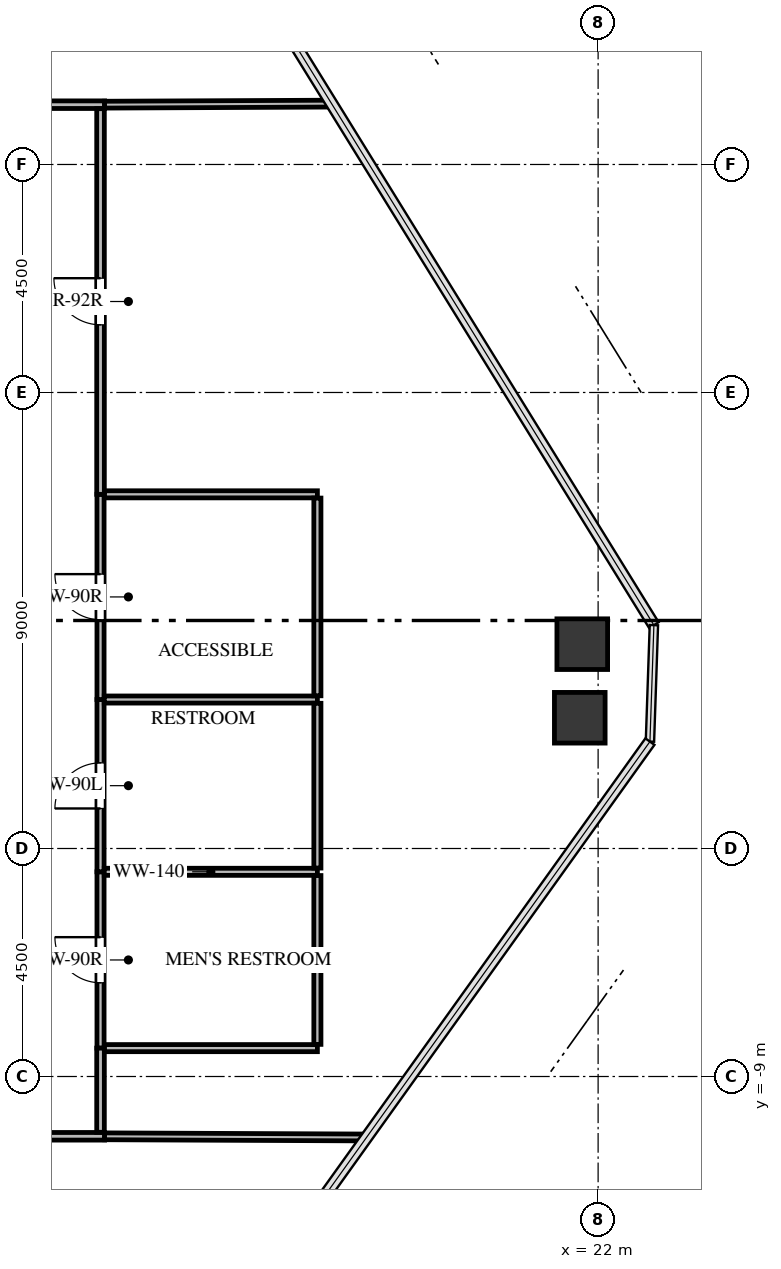
"""IFC4 building model, lengths in metres.
Left out: names, types, materials, properties, quantities, classifications, styles, units other than length and angle.
Written with IfcOpenShell. Run it as: python <this file> out.ifc"""

import sys

from ifc_helpers import new_model, si_unit, direction, frame, frame_2d, origin, origin_2d, place, context, subcontext, project, spatial, rectangle, extrude, source, transform, mapped, element, fill, save


model = new_model("IFC4")
c1 = context("Model", 3, precision=1e-05, world=origin(), true_north=direction((0.0, 1.0)))
c2 = subcontext(c1, "Body", "Model", "MODEL_VIEW")
j1 = project(units=[si_unit("LENGTHUNIT", "METRE"), si_unit("PLANEANGLEUNIT", "RADIAN")], contexts=[c1])
p1 = place(None, origin())
s1 = spatial("IfcSite", under=j1, at=p1, CompositionType="ELEMENT")
p2 = place(p1, origin())
s2 = spatial("IfcBuilding", under=s1, at=p2, CompositionType="ELEMENT")
p3 = place(p2, frame((0.0, 0.0, 162.6)))
s3 = spatial("IfcBuildingStorey", under=s2, at=p3, CompositionType="ELEMENT", Elevation=162.6)
m1 = source(origin(), c2, "Body", "SweptSolid", [
    extrude(rectangle(XDim=1.0, YDim=1.0, at=origin_2d()), origin(), (0.0, 0.0, 1.0), 4.68),
])
for number, where, z_axis, x_axis in (
    (1, (21.687, -0.467, -0.32), (0.0, 0.0, 1.0), (1.0, 0.0, 0.0)),
    (2, (21.638, -1.92, -0.32), (0.0, 0.0, 1.0), (1.0, 0.0, 0.0)),
):
    element("IfcColumn", number, at=place(p3, frame(where, z_axis=z_axis, x_axis=x_axis)), inside=s3, PredefinedType="COLUMN", context=c2, shape_type="MappedRepresentation", body=[
        mapped(m1, transform((0.0, 0.0, 0.0), x_axis=(1.0, 0.0, 0.0), y_axis=(0.0, 1.0, 0.0), z_axis=(0.0, 0.0, 1.0), scale=1.0)),
    ])
p4 = place(p3, frame((12.18, -8.44, 0.0), z_axis=(0.0, 0.0, 1.0), x_axis=(0.0, 1.0, 0.0)))
e3 = element("IfcWall", 3, at=p4, inside=s3, PredefinedType="PARTITIONING", context=c2, shape_type="SweptSolid", body=[
    extrude(rectangle(XDim=3.48, YDim=0.14, at=frame_2d((1.74, 0.0))), origin(), (0.0, 0.0, 1.0), 4.345),
])
p5 = place(p4, frame((1.29, 0.0, 0.0)))
e4 = element("IfcOpeningElement", 4, at=p5, cuts=e3, PredefinedType="OPENING", context=c2, shape_type="SweptSolid", body=[
    extrude(rectangle(XDim=0.9, YDim=2.05, at=frame_2d((0.45, 1.025))), frame((0.0, 0.08, 0.0), z_axis=(0.0, -1.0, 0.0), x_axis=(1.0, 0.0, 0.0)), (0.0, 0.0, 1.0), 0.16),
])
p6 = place(p3, frame((12.18, -4.96, 0.0), z_axis=(0.0, 0.0, 1.0), x_axis=(0.0, 1.0, 0.0)))
e5 = element("IfcWall", 5, at=p6, inside=s3, PredefinedType="PARTITIONING", context=c2, shape_type="SweptSolid", body=[
    extrude(rectangle(XDim=3.4, YDim=0.14, at=frame_2d((1.7, 0.0))), origin(), (0.0, 0.0, 1.0), 4.345),
])
p7 = place(p6, frame((1.25, 0.0, 0.0)))
e6 = element("IfcOpeningElement", 6, at=p7, cuts=e5, PredefinedType="OPENING", context=c2, shape_type="SweptSolid", body=[
    extrude(rectangle(XDim=0.9, YDim=2.05, at=frame_2d((0.45, 1.025))), frame((0.0, 0.08, 0.0), z_axis=(0.0, -1.0, 0.0), x_axis=(1.0, 0.0, 0.0)), (0.0, 0.0, 1.0), 0.16),
])
p8 = place(p3, frame((12.18, -1.56, 0.0), z_axis=(0.0, 0.0, 1.0), x_axis=(0.0, 1.0, 0.0)))
e7 = element("IfcWall", 7, at=p8, inside=s3, PredefinedType="PARTITIONING", context=c2, shape_type="SweptSolid", body=[
    extrude(rectangle(XDim=4.05, YDim=0.14, at=frame_2d((2.025, 0.0))), origin(), (0.0, 0.0, 1.0), 3.542),
])
p9 = place(p8, frame((1.575, 0.0, 0.0)))
e8 = element("IfcOpeningElement", 8, at=p9, cuts=e7, PredefinedType="OPENING", context=c2, shape_type="SweptSolid", body=[
    extrude(rectangle(XDim=0.9, YDim=2.05, at=frame_2d((0.45, 1.025))), frame((0.0, 0.08, 0.0), z_axis=(0.0, -1.0, 0.0), x_axis=(1.0, 0.0, 0.0)), (0.0, 0.0, 1.0), 0.16),
])
p10 = place(p3, frame((12.26, 10.18, 0.0), z_axis=(0.0, 0.0, 1.0), x_axis=(-1.0, 0.0, 0.0)))
e9 = element("IfcWall", 9, at=p10, inside=s3, PredefinedType="PARTITIONING", context=c2, shape_type="SweptSolid", body=[
    extrude(rectangle(XDim=7.72, YDim=0.15, at=frame_2d((3.86, 0.0))), origin(), (0.0, 0.0, 1.0), 3.542),
])
p11 = place(p10, frame((3.4, 0.0, 0.0)))
e10 = element("IfcOpeningElement", 10, at=p11, cuts=e9, PredefinedType="OPENING", context=c2, shape_type="SweptSolid", body=[
    extrude(rectangle(XDim=0.92, YDim=2.1, at=frame_2d((0.46, 1.05))), frame((0.0, 0.085, 0.0), z_axis=(0.0, -1.0, 0.0), x_axis=(1.0, 0.0, 0.0)), (0.0, 0.0, 1.0), 0.17),
])
p12 = place(p3, frame((3.24, -10.18, 0.0), z_axis=(0.0, 0.0, 1.0), x_axis=(1.0, 0.0, 0.0)))
e11 = element("IfcWall", 11, at=p12, inside=s3, PredefinedType="PARTITIONING", context=c2, shape_type="SweptSolid", body=[
    extrude(rectangle(XDim=9.02, YDim=0.15, at=frame_2d((4.51, 0.0))), origin(), (0.0, 0.0, 1.0), 3.542),
])
p13 = place(p12, frame((4.035, 0.0, 0.0)))
e12 = element("IfcOpeningElement", 12, at=p13, cuts=e11, PredefinedType="OPENING", context=c2, shape_type="SweptSolid", body=[
    extrude(rectangle(XDim=0.95, YDim=2.1, at=frame_2d((0.475, 1.05))), frame((0.0, 0.085, 0.0), z_axis=(0.0, -1.0, 0.0), x_axis=(1.0, 0.0, 0.0)), (0.0, 0.0, 1.0), 0.17),
])
p14 = place(p3, frame((12.18, 2.49, 0.0), z_axis=(0.0, 0.0, 1.0), x_axis=(0.0, 1.0, 0.0)))
e13 = element("IfcWall", 13, at=p14, inside=s3, PredefinedType="PARTITIONING", context=c2, shape_type="SweptSolid", body=[
    extrude(rectangle(XDim=7.611, YDim=0.15, at=frame_2d((3.806, 0.0))), origin(), (0.0, 0.0, 1.0), 4.345),
])
p15 = place(p14, frame((3.345, 0.0, 0.0)))
e14 = element("IfcOpeningElement", 14, at=p15, cuts=e13, PredefinedType="OPENING", context=c2, shape_type="SweptSolid", body=[
    extrude(rectangle(XDim=0.92, YDim=2.1, at=frame_2d((0.46, 1.05))), frame((0.0, 0.085, 0.0), z_axis=(0.0, -1.0, 0.0), x_axis=(1.0, 0.0, 0.0)), (0.0, 0.0, 1.0), 0.17),
])
p16 = place(p3, frame((12.18, -10.101, 0.0), z_axis=(0.0, 0.0, 1.0), x_axis=(0.0, 1.0, 0.0)))
e15 = element("IfcWall", 15, at=p16, inside=s3, PredefinedType="PARTITIONING", context=c2, shape_type="SweptSolid", body=[
    extrude(rectangle(XDim=1.661, YDim=0.15, at=frame_2d((0.831, 0.0))), origin(), (0.0, 0.0, 1.0), 4.345),
])
p17 = place(p3, frame((12.254, -4.96, 0.0), z_axis=(0.0, 0.0, 1.0), x_axis=(1.0, 0.0, 0.0)))
e16 = element("IfcWall", 16, at=p17, inside=s3, PredefinedType="PARTITIONING", context=c2, shape_type="SweptSolid", body=[
    extrude(rectangle(XDim=4.206, YDim=0.14, at=frame_2d((2.103, 0.0))), origin(), (0.0, 0.0, 1.0), 4.345),
])
p18 = place(p3, frame((16.46, -8.44, 0.0), z_axis=(0.0, 0.0, 1.0), x_axis=(-1.0, 0.0, 0.0)))
e17 = element("IfcWall", 17, at=p18, inside=s3, PredefinedType="PARTITIONING", context=c2, shape_type="SweptSolid", body=[
    extrude(rectangle(XDim=4.201, YDim=0.14, at=frame_2d((2.101, 0.0))), origin(), (0.0, 0.0, 1.0), 4.345),
])
p19 = place(p3, frame((16.46, -5.034, 0.0), z_axis=(0.0, 0.0, 1.0), x_axis=(0.0, -1.0, 0.0)))
e18 = element("IfcWall", 18, at=p19, inside=s3, PredefinedType="PARTITIONING", context=c2, shape_type="SweptSolid", body=[
    extrude(rectangle(XDim=3.332, YDim=0.14, at=frame_2d((1.666, 0.0))), origin(), (0.0, 0.0, 1.0), 4.345),
])
p20 = place(p3, frame((12.254, -1.56, 0.0), z_axis=(0.0, 0.0, 1.0), x_axis=(1.0, 0.0, 0.0)))
e19 = element("IfcWall", 19, at=p20, inside=s3, PredefinedType="PARTITIONING", context=c2, shape_type="SweptSolid", body=[
    extrude(rectangle(XDim=4.206, YDim=0.14, at=frame_2d((2.103, 0.0))), origin(), (0.0, 0.0, 1.0), 4.345),
])
p21 = place(p3, frame((16.46, -1.634, 0.0), z_axis=(0.0, 0.0, 1.0), x_axis=(0.0, -1.0, 0.0)))
e20 = element("IfcWall", 20, at=p21, inside=s3, PredefinedType="PARTITIONING", context=c2, shape_type="SweptSolid", body=[
    extrude(rectangle(XDim=3.252, YDim=0.14, at=frame_2d((1.626, 0.0))), origin(), (0.0, 0.0, 1.0), 4.345),
])
p22 = place(p3, frame((12.259, 2.49, 0.0), z_axis=(0.0, 0.0, 1.0), x_axis=(1.0, 0.0, 0.0)))
e21 = element("IfcWall", 21, at=p22, inside=s3, PredefinedType="PARTITIONING", context=c2, shape_type="SweptSolid", body=[
    extrude(rectangle(XDim=4.201, YDim=0.14, at=frame_2d((2.101, 0.0))), origin(), (0.0, 0.0, 1.0), 4.345),
])
p23 = place(p3, frame((16.46, 2.416, 0.0), z_axis=(0.0, 0.0, 1.0), x_axis=(0.0, -1.0, 0.0)))
e22 = element("IfcWall", 22, at=p23, inside=s3, PredefinedType="PARTITIONING", context=c2, shape_type="SweptSolid", body=[
    extrude(rectangle(XDim=3.902, YDim=0.14, at=frame_2d((1.951, 0.0))), origin(), (0.0, 0.0, 1.0), 3.542),
])
p24 = place(p3, frame((16.74, 10.201, 0.0), z_axis=(0.0, 0.0, 1.0), x_axis=(-0.999989522694, -0.004577608714, 0.0)))
e23 = element("IfcWall", 23, at=p24, inside=s3, PredefinedType="PARTITIONING", context=c2, shape_type="SweptSolid", body=[
    extrude(rectangle(XDim=4.48, YDim=0.135, at=frame_2d((2.24, 0.0))), origin(), (0.0, 0.0, 1.0), 3.699),
])
p25 = place(p3, frame((12.26, -10.18, 0.0), z_axis=(0.0, 0.0, 1.0), x_axis=(0.999990144117, -0.004439782427, 0.0)))
e24 = element("IfcWall", 24, at=p25, inside=s3, PredefinedType="PARTITIONING", context=c2, shape_type="SweptSolid", body=[
    extrude(rectangle(XDim=5.169, YDim=0.135, at=frame_2d((2.584, 0.0))), origin(), (0.0, 0.0, 1.0), 3.699),
])
m2 = source(origin(), c2, "Body", "SweptSolid", [
    extrude(rectangle(XDim=0.9, YDim=2.05, at=frame_2d((0.45, 1.025))), frame((0.0, 0.025, 0.0), z_axis=(0.0, -1.0, 0.0), x_axis=(1.0, 0.0, 0.0)), (0.0, 0.0, 1.0), 0.05),
])
p26 = place(p5, origin())
e25 = element("IfcDoor", 25, at=p26, inside=s3, OperationType="SINGLE_SWING_RIGHT", PredefinedType="DOOR", context=c2, shape_type="MappedRepresentation", body=[
    mapped(m2, transform((0.0, 0.0, 0.0), x_axis=(1.0, 0.0, 0.0), y_axis=(0.0, 1.0, 0.0), z_axis=(0.0, 0.0, 1.0), scale=1.0)),
])
fill(e4, e25)
m3 = source(origin(), c2, "Body", "SweptSolid", [
    extrude(rectangle(XDim=0.9, YDim=2.05, at=frame_2d((0.45, 1.025))), frame((0.0, 0.025, 0.0), z_axis=(0.0, -1.0, 0.0), x_axis=(1.0, 0.0, 0.0)), (0.0, 0.0, 1.0), 0.05),
])
p27 = place(p7, origin())
e26 = element("IfcDoor", 26, at=p27, inside=s3, OperationType="SINGLE_SWING_LEFT", PredefinedType="DOOR", context=c2, shape_type="MappedRepresentation", body=[
    mapped(m3, transform((0.0, 0.0, 0.0), x_axis=(1.0, 0.0, 0.0), y_axis=(0.0, 1.0, 0.0), z_axis=(0.0, 0.0, 1.0), scale=1.0)),
])
fill(e6, e26)
p28 = place(p9, origin())
e27 = element("IfcDoor", 27, at=p28, inside=s3, OperationType="SINGLE_SWING_RIGHT", PredefinedType="DOOR", context=c2, shape_type="MappedRepresentation", body=[
    mapped(m2, transform((0.0, 0.0, 0.0), x_axis=(1.0, 0.0, 0.0), y_axis=(0.0, 1.0, 0.0), z_axis=(0.0, 0.0, 1.0), scale=1.0)),
])
fill(e8, e27)
m4 = source(origin(), c2, "Body", "SweptSolid", [
    extrude(rectangle(XDim=0.92, YDim=2.1, at=frame_2d((0.46, 1.05))), frame((0.0, 0.025, 0.0), z_axis=(0.0, -1.0, 0.0), x_axis=(1.0, 0.0, 0.0)), (0.0, 0.0, 1.0), 0.05),
])
p29 = place(p15, origin())
e28 = element("IfcDoor", 28, at=p29, inside=s3, OperationType="SINGLE_SWING_RIGHT", PredefinedType="DOOR", context=c2, shape_type="MappedRepresentation", body=[
    mapped(m4, transform((0.0, 0.0, 0.0), x_axis=(1.0, 0.0, 0.0), y_axis=(0.0, 1.0, 0.0), z_axis=(0.0, 0.0, 1.0), scale=1.0)),
])
fill(e14, e28)
save(model, sys.argv[1])
